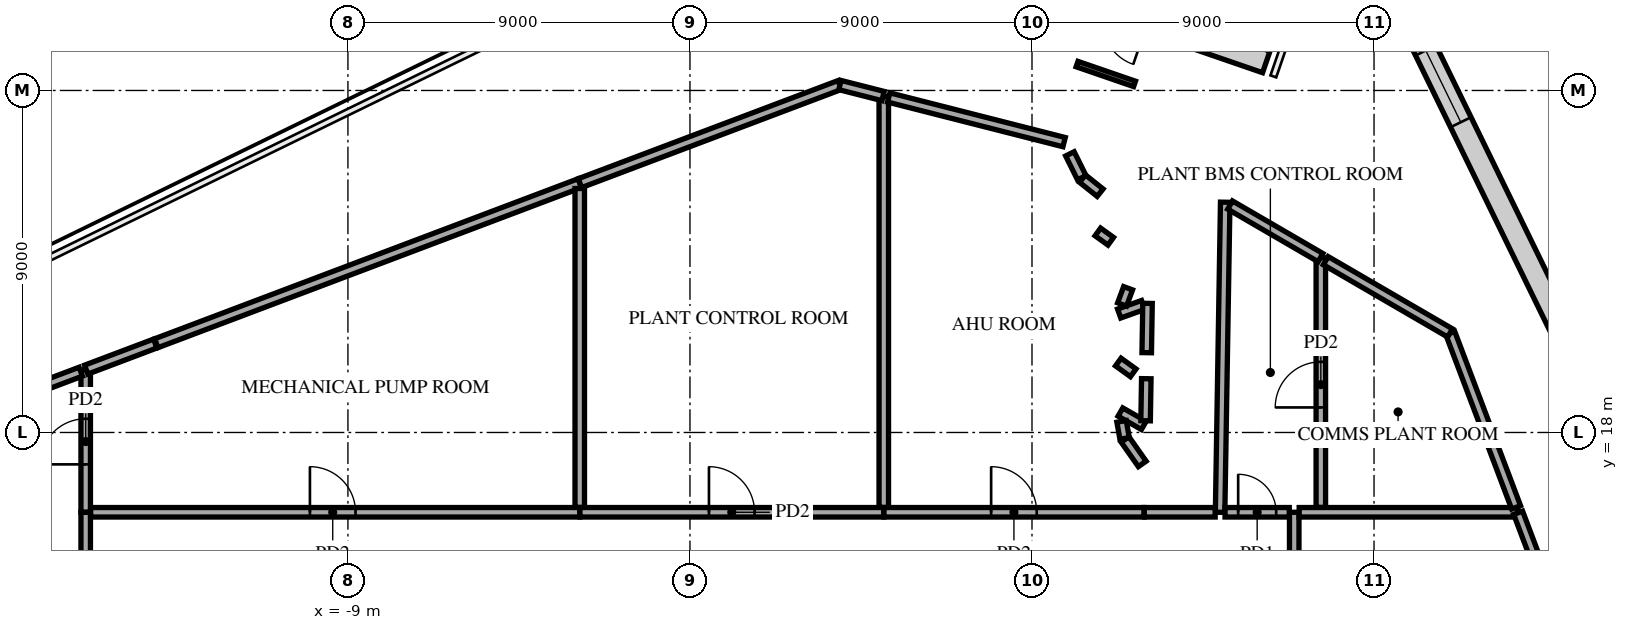
"""IFC4 building model, lengths in metres.
Left out: names, types, materials, properties, quantities, classifications, styles, units other than length and angle.
Written with IfcOpenShell. Run it as: python <this file> out.ifc"""

import sys

from ifc_helpers import new_model, si_unit, direction, frame, frame_2d, origin, place, context, subcontext, project, spatial, rectangle, extrude, element, fill, save


model = new_model("IFC4")
c1 = context("Model", 3, precision=1e-05, world=origin(), true_north=direction((0.0, 1.0)))
c2 = subcontext(c1, "Body", "Model", "MODEL_VIEW")
j1 = project(units=[si_unit("LENGTHUNIT", "METRE"), si_unit("PLANEANGLEUNIT", "RADIAN")], contexts=[c1])
p1 = place(None, origin())
s1 = spatial("IfcSite", under=j1, at=p1, CompositionType="ELEMENT")
p2 = place(p1, origin())
s2 = spatial("IfcBuilding", under=s1, at=p2, CompositionType="ELEMENT")
p3 = place(p2, frame((0.0, 0.0, 130.1)))
s3 = spatial("IfcBuildingStorey", under=s2, at=p3, CompositionType="ELEMENT", Elevation=130.1)
p4 = place(p3, frame((15.9, -13.805, 0.0), z_axis=(0.0, 0.0, 1.0), x_axis=(0.0, 1.0, 0.0)))
e1 = element("IfcWall", 1, at=p4, inside=s3, PredefinedType="PARTITIONING", context=c2, shape_type="SweptSolid", body=[
    extrude(rectangle(XDim=29.705, YDim=0.25, at=frame_2d((14.852, 0.0))), origin(), (0.0, 0.0, 1.0), 4.08),
])
p5 = place(p4, frame((25.105, 0.0, 0.0)))
e2 = element("IfcOpeningElement", 2, at=p5, cuts=e1, PredefinedType="OPENING", context=c2, shape_type="SweptSolid", body=[
    extrude(rectangle(XDim=1.2, YDim=2.1, at=frame_2d((0.6, 1.05))), frame((0.0, 0.135, 0.0), z_axis=(0.0, -1.0, 0.0), x_axis=(1.0, 0.0, 0.0)), (0.0, 0.0, 1.0), 0.27),
])
p6 = place(p4, frame((12.605, 0.0, 0.0)))
e3 = element("IfcOpeningElement", 3, at=p6, cuts=e1, PredefinedType="OPENING", context=c2, shape_type="SweptSolid", body=[
    extrude(rectangle(XDim=2.4, YDim=2.4, at=frame_2d((1.2, 1.2))), frame((0.0, 0.135, 0.0), z_axis=(0.0, -1.0, 0.0), x_axis=(1.0, 0.0, 0.0)), (0.0, 0.0, 1.0), 0.27),
])
p7 = place(p4, frame((5.5, 0.0, 0.0)))
e4 = element("IfcOpeningElement", 4, at=p7, cuts=e1, PredefinedType="OPENING", context=c2, shape_type="SweptSolid", body=[
    extrude(rectangle(XDim=1.2, YDim=2.1, at=frame_2d((0.6, 1.05))), frame((0.0, 0.135, 0.0), z_axis=(0.0, -1.0, 0.0), x_axis=(1.0, 0.0, 0.0)), (0.0, 0.0, 1.0), 0.27),
])
p8 = place(p3, frame((-15.9, 14.73, 0.0), z_axis=(0.0, 0.0, 1.0), x_axis=(0.0, 1.0, 0.0)))
e5 = element("IfcWall", 5, at=p8, inside=s3, PredefinedType="PARTITIONING", context=c2, shape_type="SweptSolid", body=[
    extrude(rectangle(XDim=1.17, YDim=0.25, at=frame_2d((0.585, 0.0))), origin(), (0.0, 0.0, 1.0), 4.63),
])
p9 = place(p3, frame((-15.9, 15.905, 0.0), z_axis=(0.0, 0.0, 1.0), x_axis=(0.0, 1.0, 0.0)))
e6 = element("IfcWall", 6, at=p9, inside=s3, PredefinedType="PARTITIONING", context=c2, shape_type="SweptSolid", body=[
    extrude(rectangle(XDim=3.744, YDim=0.25, at=frame_2d((1.872, 0.0))), origin(), (0.0, 0.0, 1.0), 4.172),
])
p10 = place(p9, frame((1.256, 0.0, 0.0)))
e7 = element("IfcOpeningElement", 7, at=p10, cuts=e6, PredefinedType="OPENING", context=c2, shape_type="SweptSolid", body=[
    extrude(rectangle(XDim=1.2, YDim=2.1, at=frame_2d((0.6, 1.05))), frame((0.0, 0.135, 0.0), z_axis=(0.0, -1.0, 0.0), x_axis=(1.0, 0.0, 0.0)), (0.0, 0.0, 1.0), 0.27),
])
p11 = place(p3, frame((-15.77, 15.9, 0.0), z_axis=(0.0, 0.0, 1.0), x_axis=(1.0, 0.0, 0.0)))
e8 = element("IfcWall", 8, at=p11, inside=s3, PredefinedType="PARTITIONING", context=c2, shape_type="SweptSolid", body=[
    extrude(rectangle(XDim=12.87, YDim=0.25, at=frame_2d((6.435, 0.0))), origin(), (0.0, 0.0, 1.0), 4.63),
])
p12 = place(p11, frame((5.77, 0.0, 0.0)))
e9 = element("IfcOpeningElement", 9, at=p12, cuts=e8, PredefinedType="OPENING", context=c2, shape_type="SweptSolid", body=[
    extrude(rectangle(XDim=1.2, YDim=2.1, at=frame_2d((0.6, 1.05))), frame((0.0, 0.135, 0.0), z_axis=(0.0, -1.0, 0.0), x_axis=(1.0, 0.0, 0.0)), (0.0, 0.0, 1.0), 0.27),
])
p13 = place(p3, frame((-2.895, 15.9, 0.0), z_axis=(0.0, 0.0, 1.0), x_axis=(1.0, 0.0, 0.0)))
e10 = element("IfcWall", 10, at=p13, inside=s3, PredefinedType="PARTITIONING", context=c2, shape_type="SweptSolid", body=[
    extrude(rectangle(XDim=7.995, YDim=0.25, at=frame_2d((3.998, 0.0))), origin(), (0.0, 0.0, 1.0), 4.63),
])
p14 = place(p13, frame((3.395, 0.0, 0.0)))
e11 = element("IfcOpeningElement", 11, at=p14, cuts=e10, PredefinedType="OPENING", context=c2, shape_type="SweptSolid", body=[
    extrude(rectangle(XDim=1.2, YDim=2.1, at=frame_2d((0.6, 1.05))), frame((0.0, 0.135, 0.0), z_axis=(0.0, -1.0, 0.0), x_axis=(1.0, 0.0, 0.0)), (0.0, 0.0, 1.0), 0.27),
])
p15 = place(p3, frame((5.105, 15.9, 0.0), z_axis=(0.0, 0.0, 1.0), x_axis=(1.0, 0.0, 0.0)))
e12 = element("IfcWall", 12, at=p15, inside=s3, PredefinedType="PARTITIONING", context=c2, shape_type="SweptSolid", body=[
    extrude(rectangle(XDim=6.844, YDim=0.25, at=frame_2d((3.422, 0.0))), origin(), (0.0, 0.0, 1.0), 4.08),
])
p16 = place(p15, frame((2.82, 0.0, 0.0)))
e13 = element("IfcOpeningElement", 13, at=p16, cuts=e12, PredefinedType="OPENING", context=c2, shape_type="SweptSolid", body=[
    extrude(rectangle(XDim=1.2, YDim=2.1, at=frame_2d((0.6, 1.05))), frame((0.0, 0.135, 0.0), z_axis=(0.0, -1.0, 0.0), x_axis=(1.0, 0.0, 0.0)), (0.0, 0.0, 1.0), 0.27),
])
p17 = place(p3, frame((13.95, 15.9, 0.0), z_axis=(0.0, 0.0, 1.0), x_axis=(0.016484399982, 0.999864123047, 0.0)))
e14 = element("IfcWall", 14, at=p17, inside=s3, PredefinedType="PARTITIONING", context=c2, shape_type="SweptSolid", body=[
    extrude(rectangle(XDim=8.161, YDim=0.25, at=frame_2d((4.08, 0.0))), origin(), (0.0, 0.0, 1.0), 4.63),
])
p18 = place(p3, frame((14.08, 15.9, 0.0), z_axis=(0.0, 0.0, 1.0), x_axis=(1.0, 0.0, 0.0)))
e15 = element("IfcWall", 15, at=p18, inside=s3, PredefinedType="PARTITIONING", context=c2, shape_type="SweptSolid", body=[
    extrude(rectangle(XDim=1.69, YDim=0.25, at=frame_2d((0.845, 0.0))), origin(), (0.0, 0.0, 1.0), 4.63),
])
p19 = place(p18, frame((0.345, 0.0, 0.0)))
e16 = element("IfcOpeningElement", 16, at=p19, cuts=e15, PredefinedType="OPENING", context=c2, shape_type="SweptSolid", body=[
    extrude(rectangle(XDim=1.0, YDim=2.1, at=frame_2d((0.5, 1.05))), frame((0.0, 0.135, 0.0), z_axis=(0.0, -1.0, 0.0), x_axis=(1.0, 0.0, 0.0)), (0.0, 0.0, 1.0), 0.27),
])
p20 = place(p3, frame((11.954, 15.9, 0.0), z_axis=(0.0, 0.0, 1.0), x_axis=(1.0, 0.0, 0.0)))
e17 = element("IfcWall", 17, at=p20, inside=s3, PredefinedType="PARTITIONING", context=c2, shape_type="SweptSolid", body=[
    extrude(rectangle(XDim=1.866, YDim=0.25, at=frame_2d((0.933, 0.0))), origin(), (0.0, 0.0, 1.0), 4.63),
])
p21 = place(p3, frame((16.03, 15.9, 0.0), z_axis=(0.0, 0.0, 1.0), x_axis=(1.0, 0.0, 0.0)))
e18 = element("IfcWall", 18, at=p21, inside=s3, PredefinedType="PARTITIONING", context=c2, shape_type="SweptSolid", body=[
    extrude(rectangle(XDim=5.757, YDim=0.25, at=frame_2d((2.879, 0.0))), origin(), (0.0, 0.0, 1.0), 4.63),
])
p22 = place(p3, frame((21.792, 15.887, 0.0), z_axis=(0.0, 0.0, 1.0), x_axis=(0.353316978095, -0.935503668079, 0.0)))
e19 = element("IfcWall", 19, at=p22, inside=s3, PredefinedType="PARTITIONING", context=c2, shape_type="SweptSolid", body=[
    extrude(rectangle(XDim=7.157, YDim=0.25, at=frame_2d((3.578, 0.0))), origin(), (0.0, 0.0, 1.0), 4.63),
])
p23 = place(p3, frame((11.448, 17.817, 0.0), z_axis=(0.0, 0.0, 1.0), x_axis=(0.575769861606, -0.817611806707, 0.0)))
e20 = element("IfcWall", 20, at=p23, inside=s3, PredefinedType="PARTITIONING", context=c2, shape_type="SweptSolid", body=[
    extrude(rectangle(XDim=0.787, YDim=0.25, at=frame_2d((0.394, 0.0))), origin(), (0.0, 0.0, 1.0), 4.63),
])
p24 = place(p3, frame((11.327, 18.538, 0.0), z_axis=(0.0, 0.0, 1.0), x_axis=(0.867222766703, -0.49792034796, 0.0)))
e21 = element("IfcWall", 21, at=p24, inside=s3, PredefinedType="PARTITIONING", context=c2, shape_type="SweptSolid", body=[
    extrude(rectangle(XDim=0.708, YDim=0.25, at=frame_2d((0.354, 0.0))), origin(), (0.0, 0.0, 1.0), 4.63),
])
p25 = place(p3, frame((11.357, 18.292, 0.0), z_axis=(0.0, 0.0, 1.0), x_axis=(0.175957739837, -0.984397721346, 0.0)))
e22 = element("IfcWall", 22, at=p25, inside=s3, PredefinedType="PARTITIONING", context=c2, shape_type="SweptSolid", body=[
    extrude(rectangle(XDim=0.455, YDim=0.25, at=frame_2d((0.228, 0.0))), origin(), (0.0, 0.0, 1.0), 4.63),
])
p26 = place(p3, frame((-18.445, 18.688, 0.0), z_axis=(0.0, 0.0, 1.0), x_axis=(0.935490853033, 0.353350907586, 0.0)))
e23 = element("IfcWall", 23, at=p26, inside=s3, PredefinedType="PARTITIONING", context=c2, shape_type="SweptSolid", body=[
    extrude(rectangle(XDim=2.581, YDim=0.25, at=frame_2d((1.291, 0.0))), origin(), (0.0, 0.0, 1.0), 5.2),
])
p27 = place(p3, frame((11.989, 18.308, 0.0), z_axis=(0.0, 0.0, 1.0), x_axis=(0.016539422382, 0.999863214398, 0.0)))
e24 = element("IfcWall", 24, at=p27, inside=s3, PredefinedType="PARTITIONING", context=c2, shape_type="SweptSolid", body=[
    extrude(rectangle(XDim=1.107, YDim=0.25, at=frame_2d((0.554, 0.0))), origin(), (0.0, 0.0, 1.0), 4.63),
])
p28 = place(p3, frame((-15.887, 19.654, 0.0), z_axis=(0.0, 0.0, 1.0), x_axis=(0.935489638932, 0.353354121881, 0.0)))
e25 = element("IfcWall", 25, at=p28, inside=s3, PredefinedType="PARTITIONING", context=c2, shape_type="SweptSolid", body=[
    extrude(rectangle(XDim=1.942, YDim=0.25, at=frame_2d((0.971, 0.0))), origin(), (0.0, 0.0, 1.0), 5.2),
])
p29 = place(p3, frame((11.271, 19.853, 0.0), z_axis=(0.0, 0.0, 1.0), x_axis=(0.810758993414, -0.585380094125, 0.0)))
e26 = element("IfcWall", 26, at=p29, inside=s3, PredefinedType="PARTITIONING", context=c2, shape_type="SweptSolid", body=[
    extrude(rectangle(XDim=0.484, YDim=0.25, at=frame_2d((0.242, 0.0))), origin(), (0.0, 0.0, 1.0), 4.63),
])
p30 = place(p3, frame((-14.043, 20.348, 0.0), z_axis=(0.0, 0.0, 1.0), x_axis=(0.935424055247, 0.353527703109, 0.0)))
e27 = element("IfcWall", 27, at=p30, inside=s3, PredefinedType="PARTITIONING", context=c2, shape_type="SweptSolid", body=[
    extrude(rectangle(XDim=11.913, YDim=0.25, at=frame_2d((5.956, 0.0))), origin(), (0.0, 0.0, 1.0), 4.172),
])
p31 = place(p3, frame((20.006, 20.616, 0.0), z_axis=(0.0, 0.0, 1.0), x_axis=(0.353332775747, -0.935497701538, 0.0)))
e28 = element("IfcWall", 28, at=p31, inside=s3, PredefinedType="PARTITIONING", context=c2, shape_type="SweptSolid", body=[
    extrude(rectangle(XDim=4.902, YDim=0.25, at=frame_2d((2.451, 0.0))), origin(), (0.0, 0.0, 1.0), 4.172),
])
p32 = place(p3, frame((11.293, 21.13, 0.0), z_axis=(0.0, 0.0, 1.0), x_axis=(0.941428763691, 0.337211925789, 0.0)))
e29 = element("IfcWall", 29, at=p32, inside=s3, PredefinedType="PARTITIONING", context=c2, shape_type="SweptSolid", body=[
    extrude(rectangle(XDim=0.671, YDim=0.25, at=frame_2d((0.335, 0.0))), origin(), (0.0, 0.0, 1.0), 4.63),
])
p33 = place(p3, frame((12.019, 20.1, 0.0), z_axis=(0.0, 0.0, 1.0), x_axis=(0.016369654256, 0.999866008233, 0.0)))
e30 = element("IfcWall", 30, at=p33, inside=s3, PredefinedType="PARTITIONING", context=c2, shape_type="SweptSolid", body=[
    extrude(rectangle(XDim=1.298, YDim=0.25, at=frame_2d((0.649, 0.0))), origin(), (0.0, 0.0, 1.0), 4.63),
])
p34 = place(p3, frame((11.371, 21.369, 0.0), z_axis=(0.0, 0.0, 1.0), x_axis=(0.346947564086, 0.937884527954, 0.0)))
e31 = element("IfcWall", 31, at=p34, inside=s3, PredefinedType="PARTITIONING", context=c2, shape_type="SweptSolid", body=[
    extrude(rectangle(XDim=0.455, YDim=0.25, at=frame_2d((0.228, 0.0))), origin(), (0.0, 0.0, 1.0), 4.63),
])
p35 = place(p3, frame((16.6, 16.03, 0.0), z_axis=(0.0, 0.0, 1.0), x_axis=(0.0, 1.0, 0.0)))
e32 = element("IfcWall", 32, at=p35, inside=s3, PredefinedType="PARTITIONING", context=c2, shape_type="SweptSolid", body=[
    extrude(rectangle(XDim=6.567, YDim=0.25, at=frame_2d((3.283, 0.0))), origin(), (0.0, 0.0, 1.0), 4.63),
])
p36 = place(p35, frame((2.629, 0.0, 0.0)))
e33 = element("IfcOpeningElement", 33, at=p36, cuts=e32, PredefinedType="OPENING", context=c2, shape_type="SweptSolid", body=[
    extrude(rectangle(XDim=1.2, YDim=2.1, at=frame_2d((0.6, 1.05))), frame((0.0, 0.135, 0.0), z_axis=(0.0, -1.0, 0.0), x_axis=(1.0, 0.0, 0.0)), (0.0, 0.0, 1.0), 0.27),
])
p37 = place(p3, frame((16.73, 22.521, 0.0), z_axis=(0.0, 0.0, 1.0), x_axis=(0.864489579018, -0.502650741339, 0.0)))
e34 = element("IfcWall", 34, at=p37, inside=s3, PredefinedType="PARTITIONING", context=c2, shape_type="SweptSolid", body=[
    extrude(rectangle(XDim=3.783, YDim=0.25, at=frame_2d((1.892, 0.0))), origin(), (0.0, 0.0, 1.0), 4.172),
])
p38 = place(p3, frame((10.733, 23.277, 0.0), z_axis=(0.0, 0.0, 1.0), x_axis=(0.810848278234, -0.585256413621, 0.0)))
e35 = element("IfcWall", 35, at=p38, inside=s3, PredefinedType="PARTITIONING", context=c2, shape_type="SweptSolid", body=[
    extrude(rectangle(XDim=0.419, YDim=0.25, at=frame_2d((0.209, 0.0))), origin(), (0.0, 0.0, 1.0), 5.2),
])
p39 = place(p3, frame((14.213, 23.985, 0.0), z_axis=(0.0, 0.0, 1.0), x_axis=(0.864482972214, -0.502662103954, 0.0)))
e36 = element("IfcWall", 36, at=p39, inside=s3, PredefinedType="PARTITIONING", context=c2, shape_type="SweptSolid", body=[
    extrude(rectangle(XDim=2.751, YDim=0.25, at=frame_2d((1.375, 0.0))), origin(), (0.0, 0.0, 1.0), 4.63),
])
p40 = place(p3, frame((-2.9, 16.03, 0.0), z_axis=(0.0, 0.0, 1.0), x_axis=(0.0, 1.0, 0.0)))
e37 = element("IfcWall", 37, at=p40, inside=s3, PredefinedType="PARTITIONING", context=c2, shape_type="SweptSolid", body=[
    extrude(rectangle(XDim=8.391, YDim=0.25, at=frame_2d((4.195, 0.0))), origin(), (0.0, 0.0, 1.0), 5.2),
])
p41 = place(p3, frame((-2.895, 24.561, 0.0), z_axis=(0.0, 0.0, 1.0), x_axis=(0.935473811729, 0.353396020873, 0.0)))
e38 = element("IfcWall", 38, at=p41, inside=s3, PredefinedType="PARTITIONING", context=c2, shape_type="SweptSolid", body=[
    extrude(rectangle(XDim=7.308, YDim=0.25, at=frame_2d((3.654, 0.0))), origin(), (0.0, 0.0, 1.0), 4.63),
])
p42 = place(p3, frame((10.328, 24.681, 0.0), z_axis=(0.0, 0.0, 1.0), x_axis=(0.781589922585, -0.623792588056, 0.0)))
e39 = element("IfcWall", 39, at=p42, inside=s3, PredefinedType="PARTITIONING", context=c2, shape_type="SweptSolid", body=[
    extrude(rectangle(XDim=0.594, YDim=0.25, at=frame_2d((0.297, 0.0))), origin(), (0.0, 0.0, 1.0), 5.2),
])
p43 = place(p3, frame((9.998, 25.332, 0.0), z_axis=(0.0, 0.0, 1.0), x_axis=(0.44484509169, -0.895607528105, 0.0)))
e40 = element("IfcWall", 40, at=p43, inside=s3, PredefinedType="PARTITIONING", context=c2, shape_type="SweptSolid", body=[
    extrude(rectangle(XDim=0.701, YDim=0.25, at=frame_2d((0.351, 0.0))), origin(), (0.0, 0.0, 1.0), 5.2),
])
p44 = place(p3, frame((5.1, 16.03, 0.0), z_axis=(0.0, 0.0, 1.0), x_axis=(0.0, 1.0, 0.0)))
e41 = element("IfcWall", 41, at=p44, inside=s3, PredefinedType="PARTITIONING", context=c2, shape_type="SweptSolid", body=[
    extrude(rectangle(XDim=10.819, YDim=0.25, at=frame_2d((5.409, 0.0))), origin(), (0.0, 0.0, 1.0), 5.2),
])
p45 = place(p3, frame((5.23, 26.815, 0.0), z_axis=(0.0, 0.0, 1.0), x_axis=(0.969086921924, -0.246719552844, 0.0)))
e42 = element("IfcWall", 42, at=p45, inside=s3, PredefinedType="PARTITIONING", context=c2, shape_type="SweptSolid", body=[
    extrude(rectangle(XDim=4.762, YDim=0.25, at=frame_2d((2.381, 0.0))), origin(), (0.0, 0.0, 1.0), 4.08),
])
p46 = place(p3, frame((3.947, 27.142, 0.0), z_axis=(0.0, 0.0, 1.0), x_axis=(0.969039997303, -0.246903794273, 0.0)))
e43 = element("IfcWall", 43, at=p46, inside=s3, PredefinedType="PARTITIONING", context=c2, shape_type="SweptSolid", body=[
    extrude(rectangle(XDim=1.17, YDim=0.25, at=frame_2d((0.585, 0.0))), origin(), (0.0, 0.0, 1.0), 5.2),
])
p47 = place(p3, frame((36.722, -7.541, 0.0), z_axis=(0.0, 0.0, 1.0), x_axis=(-0.438370098475, 0.898794557596, 0.0)))
e44 = element("IfcWall", 44, at=p47, inside=s3, PredefinedType="STANDARD", context=c2, shape_type="SweptSolid", body=[
    extrude(rectangle(XDim=45.376, YDim=0.6, at=frame_2d((22.688, 0.0))), origin(), (0.0, 0.0, 1.0), 5.2),
])
p48 = place(p47, frame((1.163, 0.0, 0.6)))
e45 = element("IfcOpeningElement", 45, at=p48, cuts=e44, PredefinedType="OPENING", context=c2, shape_type="SweptSolid", body=[
    extrude(rectangle(XDim=2.1, YDim=4.15, at=frame_2d((1.05, 2.075))), frame((0.0, 0.31, 0.0), z_axis=(0.0, -1.0, 0.0), x_axis=(1.0, 0.0, 0.0)), (0.0, 0.0, 1.0), 0.62),
])
p49 = place(p47, frame((5.651, 0.0, 0.6)))
e46 = element("IfcOpeningElement", 46, at=p49, cuts=e44, PredefinedType="OPENING", context=c2, shape_type="SweptSolid", body=[
    extrude(rectangle(XDim=2.1, YDim=4.15, at=frame_2d((1.05, 2.075))), frame((0.0, 0.31, 0.0), z_axis=(0.0, -1.0, 0.0), x_axis=(1.0, 0.0, 0.0)), (0.0, 0.0, 1.0), 0.62),
])
p50 = place(p47, frame((37.501, 0.0, 0.6)))
e47 = element("IfcOpeningElement", 47, at=p50, cuts=e44, PredefinedType="OPENING", context=c2, shape_type="SweptSolid", body=[
    extrude(rectangle(XDim=2.1, YDim=4.15, at=frame_2d((1.05, 2.075))), frame((0.0, 0.31, 0.0), z_axis=(0.0, -1.0, 0.0), x_axis=(1.0, 0.0, 0.0)), (0.0, 0.0, 1.0), 0.62),
])
p51 = place(p47, frame((42.051, 0.0, 0.6)))
e48 = element("IfcOpeningElement", 48, at=p51, cuts=e44, PredefinedType="OPENING", context=c2, shape_type="SweptSolid", body=[
    extrude(rectangle(XDim=2.1, YDim=4.15, at=frame_2d((1.05, 2.075))), frame((0.0, 0.31, 0.0), z_axis=(0.0, -1.0, 0.0), x_axis=(1.0, 0.0, 0.0)), (0.0, 0.0, 1.0), 0.62),
])
p52 = place(p3, frame((15.165, 27.751, 0.0), z_axis=(0.0, 0.0, 1.0), x_axis=(-0.945516977766, 0.325572794866, 0.0)))
e49 = element("IfcWall", 49, at=p52, inside=s3, PredefinedType="STANDARD", context=c2, shape_type="SweptSolid", body=[
    extrude(rectangle(XDim=2.989, YDim=0.6, at=frame_2d((1.495, 0.0))), origin(), (0.0, 0.0, 1.0), 5.2),
])
p53 = place(p3, frame((11.698, 27.174, 0.0), z_axis=(0.0, 0.0, 1.0), x_axis=(-0.945556061461, 0.325459267242, 0.0)))
e50 = element("IfcWall", 50, at=p53, inside=s3, PredefinedType="PARTITIONING", context=c2, shape_type="SweptSolid", body=[
    extrude(rectangle(XDim=1.6, YDim=0.15, at=frame_2d((0.8, 0.0))), origin(), (0.0, 0.0, 1.0), 0.7),
])
p54 = place(p12, origin())
e51 = element("IfcDoor", 51, at=p54, inside=s3, OperationType="SINGLE_SWING_RIGHT", PredefinedType="DOOR", context=c2, shape_type="SweptSolid", body=[
    extrude(rectangle(XDim=1.2, YDim=2.1, at=frame_2d((0.6, 1.05))), frame((0.0, 0.025, 0.0), z_axis=(0.0, -1.0, 0.0), x_axis=(1.0, 0.0, 0.0)), (0.0, 0.0, 1.0), 0.05),
])
fill(e9, e51)
p55 = place(p14, origin())
e52 = element("IfcDoor", 52, at=p55, inside=s3, OperationType="SINGLE_SWING_LEFT", PredefinedType="DOOR", context=c2, shape_type="SweptSolid", body=[
    extrude(rectangle(XDim=1.2, YDim=2.1, at=frame_2d((0.6, 1.05))), frame((0.0, 0.025, 0.0), z_axis=(0.0, -1.0, 0.0), x_axis=(1.0, 0.0, 0.0)), (0.0, 0.0, 1.0), 0.05),
])
fill(e11, e52)
p56 = place(p16, origin())
e53 = element("IfcDoor", 53, at=p56, inside=s3, OperationType="SINGLE_SWING_RIGHT", PredefinedType="DOOR", context=c2, shape_type="SweptSolid", body=[
    extrude(rectangle(XDim=1.2, YDim=2.1, at=frame_2d((0.6, 1.05))), frame((0.0, 0.025, 0.0), z_axis=(0.0, -1.0, 0.0), x_axis=(1.0, 0.0, 0.0)), (0.0, 0.0, 1.0), 0.05),
])
fill(e13, e53)
p57 = place(p19, origin())
e54 = element("IfcDoor", 54, at=p57, inside=s3, OperationType="SINGLE_SWING_LEFT", PredefinedType="DOOR", context=c2, shape_type="SweptSolid", body=[
    extrude(rectangle(XDim=1.0, YDim=2.1, at=frame_2d((0.5, 1.05))), frame((0.0, 0.025, 0.0), z_axis=(0.0, -1.0, 0.0), x_axis=(1.0, 0.0, 0.0)), (0.0, 0.0, 1.0), 0.05),
])
fill(e16, e54)
p58 = place(p36, origin())
e55 = element("IfcDoor", 55, at=p58, inside=s3, OperationType="SINGLE_SWING_RIGHT", PredefinedType="DOOR", context=c2, shape_type="SweptSolid", body=[
    extrude(rectangle(XDim=1.2, YDim=2.1, at=frame_2d((0.6, 1.05))), frame((0.0, 0.025, 0.0), z_axis=(0.0, -1.0, 0.0), x_axis=(1.0, 0.0, 0.0)), (0.0, 0.0, 1.0), 0.05),
])
fill(e33, e55)
p59 = place(p10, origin())
e56 = element("IfcDoor", 56, at=p59, inside=s3, OperationType="SINGLE_SWING_RIGHT", PredefinedType="DOOR", context=c2, shape_type="SweptSolid", body=[
    extrude(rectangle(XDim=1.2, YDim=2.1, at=frame_2d((0.6, 1.05))), frame((0.0, 0.025, 0.0), z_axis=(0.0, -1.0, 0.0), x_axis=(1.0, 0.0, 0.0)), (0.0, 0.0, 1.0), 0.05),
])
fill(e7, e56)
p60 = place(p50, origin())
e57 = element("IfcWindow", 57, at=p60, inside=s3, PartitioningType="SINGLE_PANEL", PredefinedType="USERDEFINED", context=c2, shape_type="SweptSolid", body=[
    extrude(rectangle(XDim=2.1, YDim=4.15, at=frame_2d((1.05, 2.075))), frame((0.0, 0.03, 0.0), z_axis=(0.0, -1.0, 0.0), x_axis=(1.0, 0.0, 0.0)), (0.0, 0.0, 1.0), 0.06),
])
fill(e47, e57)
save(model, sys.argv[1])
